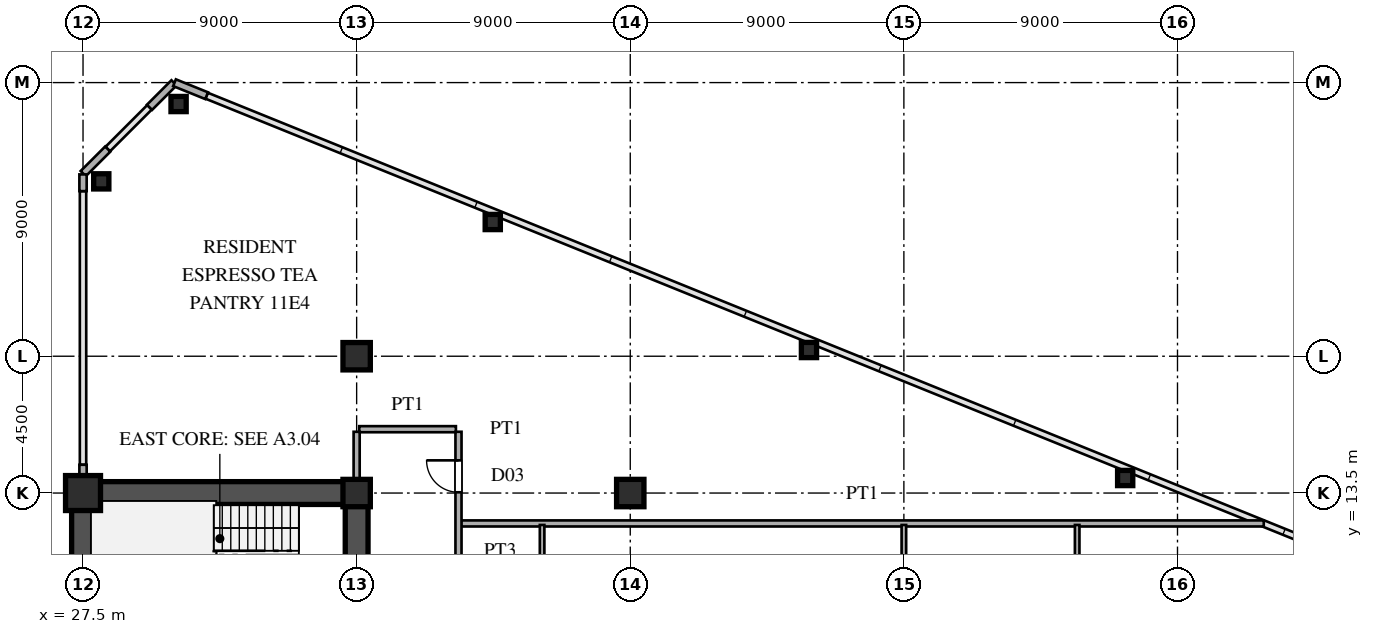
"""IFC4 building model, lengths in metres.
Left out: names, types, materials, properties, quantities, classifications, styles, units other than length and angle.
Written with IfcOpenShell. Run it as: python <this file> out.ifc"""

import sys

from ifc_helpers import new_model, si_unit, direction, frame, frame_2d, origin, origin_2d, place, context, subcontext, project, spatial, rectangle, hollow_rectangle, i_section, extrude, source, transform, mapped, element, fill, save


model = new_model("IFC4")
c1 = context("Model", 3, precision=1e-05, world=origin(), true_north=direction((0.0, 1.0)))
c2 = subcontext(c1, "Body", "Model", "MODEL_VIEW")
j1 = project(units=[si_unit("LENGTHUNIT", "METRE"), si_unit("PLANEANGLEUNIT", "RADIAN")], contexts=[c1])
p1 = place(None, origin())
s1 = spatial("IfcSite", under=j1, at=p1, CompositionType="ELEMENT")
p2 = place(p1, origin())
s2 = spatial("IfcBuilding", under=s1, at=p2, CompositionType="ELEMENT")
p3 = place(p2, frame((0.0, 0.0, 44.1)))
s3 = spatial("IfcBuildingStorey", under=s2, at=p3, CompositionType="ELEMENT", Elevation=44.1)
m1 = source(origin(), c2, "Body", "SweptSolid", [
    extrude(hollow_rectangle(XDim=1.15, YDim=1.15, WallThickness=0.048, at=origin_2d()), origin(), (0.0, 0.0, 1.0), 3.6),
])
p4 = place(p3, frame((27.5, 13.5, 0.0), z_axis=(0.0, 0.0, 1.0), x_axis=(1.0, 0.0, 0.0)))
e1 = element("IfcColumn", 1, at=p4, inside=s3, PredefinedType="COLUMN", context=c2, shape_type="MappedRepresentation", body=[
    mapped(m1, transform((0.0, 0.0, 0.0), scale=1.0)),
])
m2 = source(origin(), c2, "Body", "SweptSolid", [
    extrude(i_section(OverallWidth=0.9, OverallDepth=0.9, WebThickness=0.036, FlangeThickness=0.055, at=origin_2d()), origin(), (0.0, 0.0, 1.0), 3.6),
])
for number, where, z_axis, x_axis in (
    (2, (36.5, 13.5, 0.0), (0.0, 0.0, 1.0), (1.0, 0.0, 0.0)),
    (3, (36.5, 18.0, 0.0), (0.0, 0.0, 1.0), (1.0, 0.0, 0.0)),
    (4, (45.5, 13.5, 0.0), (0.0, 0.0, 1.0), (1.0, 0.0, 0.0)),
):
    element("IfcColumn", number, at=place(p3, frame(where, z_axis=z_axis, x_axis=x_axis)), inside=s3, PredefinedType="COLUMN", context=c2, shape_type="MappedRepresentation", body=[
        mapped(m2, transform((0.0, 0.0, 0.0), scale=1.0)),
    ])
m3 = source(origin(), c2, "Body", "SweptSolid", [
    extrude(hollow_rectangle(XDim=0.5, YDim=0.5, WallThickness=0.02, at=origin_2d()), origin(), (0.0, 0.0, 1.0), 3.6),
])
for number, where, z_axis, x_axis in (
    (5, (30.643, 26.295, 0.0), (0.0, 0.0, 1.0), (1.0, 0.0, 0.0)),
    (6, (28.1, 23.751, 0.0), (0.0, 0.0, 1.0), (1.0, 0.0, 0.0)),
    (7, (40.977, 22.414, 0.0), (0.0, 0.0, 1.0), (1.0, 0.0, 0.0)),
    (8, (51.378, 18.204, 0.0), (0.0, 0.0, 1.0), (1.0, 0.0, 0.0)),
    (9, (61.779, 13.994, 0.0), (0.0, 0.0, 1.0), (1.0, 0.0, 0.0)),
):
    element("IfcColumn", number, at=place(p3, frame(where, z_axis=z_axis, x_axis=x_axis)), inside=s3, PredefinedType="COLUMN", context=c2, shape_type="MappedRepresentation", body=[
        mapped(m3, transform((0.0, 0.0, 0.0), scale=1.0)),
    ])
p5 = place(p3, frame((31.566, 26.569, 0.0), z_axis=(0.0, 0.0, 1.0), x_axis=(-0.927007103665, 0.375043770452, 0.0)))
e10 = element("IfcWall", 10, at=p5, inside=s3, PredefinedType="SOLIDWALL", context=c2, shape_type="SweptSolid", body=[
    extrude(rectangle(XDim=1.14, YDim=0.24, at=frame_2d((0.57, 0.0))), origin(), (0.0, 0.0, 1.0), 3.38),
])
for number, where, z_axis, x_axis in (
    (11, (30.493, 26.993, 0.0), (0.0, 0.0, 1.0), (-0.707, -0.707, 0.0)),
    (12, (28.313, 24.813, 0.0), (0.0, 0.0, 1.0), (-0.707, -0.707, 0.0)),
):
    element("IfcWall", number, at=place(p3, frame(where, z_axis=z_axis, x_axis=x_axis)), inside=s3, PredefinedType="SOLIDWALL", context=c2, shape_type="SweptSolid", body=[
        extrude(rectangle(XDim=1.14, YDim=0.24, at=frame_2d((0.57, 0.0))), origin(), (0.0, 0.0, 1.0), 3.38),
    ])
p6 = place(p3, frame((27.5, 13.88, 0.0), z_axis=(0.0, 0.0, 1.0), x_axis=(0.0, 1.0, 0.0)))
e13 = element("IfcWall", 13, at=p6, inside=s3, PredefinedType="SOLIDWALL", context=c2, shape_type="SweptSolid", body=[
    extrude(rectangle(XDim=0.55, YDim=0.24, at=frame_2d((0.275, 0.0))), origin(), (0.0, 0.0, 1.0), 2.88),
])
p7 = place(p3, frame((27.5, 23.43, 0.0), z_axis=(0.0, 0.0, 1.0), x_axis=(0.0, 1.0, 0.0)))
e14 = element("IfcWall", 14, at=p7, inside=s3, PredefinedType="SOLIDWALL", context=c2, shape_type="SweptSolid", body=[
    extrude(rectangle(XDim=0.55, YDim=0.24, at=frame_2d((0.275, 0.0))), origin(), (0.0, 0.0, 1.0), 3.38),
])
p8 = place(p3, frame((27.5, 1.3, 0.0), z_axis=(0.0, 0.0, 1.0), x_axis=(0.0, 1.0, 0.0)))
e15 = element("IfcWall", 15, at=p8, inside=s3, PredefinedType="SHEAR", context=c2, shape_type="SweptSolid", body=[
    extrude(rectangle(XDim=12.2, YDim=0.75, at=frame_2d((6.1, 0.0))), origin(), (0.0, 0.0, 1.0), 3.38),
])
p9 = place(p3, frame((27.5, 13.5, 0.0), z_axis=(0.0, 0.0, 1.0), x_axis=(1.0, 0.0, 0.0)))
e16 = element("IfcWall", 16, at=p9, inside=s3, PredefinedType="SHEAR", context=c2, shape_type="SweptSolid", body=[
    extrude(rectangle(XDim=9.0, YDim=0.75, at=frame_2d((4.5, 0.0))), origin(), (0.0, 0.0, 1.0), 3.38),
])
p10 = place(p3, frame((36.5, 8.2, 0.0), z_axis=(0.0, 0.0, 1.0), x_axis=(0.0, 1.0, 0.0)))
e17 = element("IfcWall", 17, at=p10, inside=s3, PredefinedType="SHEAR", context=c2, shape_type="SweptSolid", body=[
    extrude(rectangle(XDim=5.45, YDim=0.75, at=frame_2d((2.725, 0.0))), origin(), (0.0, 0.0, 1.0), 3.38),
])
p11 = place(p10, frame((0.245, 0.0, 0.0)))
e18 = element("IfcOpeningElement", 18, at=p11, cuts=e17, PredefinedType="OPENING", context=c2, shape_type="SweptSolid", body=[
    extrude(rectangle(XDim=0.95, YDim=2.15, at=frame_2d((0.475, 1.075))), frame((0.0, 0.385, 0.0), z_axis=(0.0, -1.0, 0.0), x_axis=(1.0, 0.0, 0.0)), (0.0, 0.0, 1.0), 0.77),
])
p12 = place(p3, frame((39.93, 12.5, 0.0), z_axis=(0.0, 0.0, 1.0), x_axis=(1.0, 0.0, 0.0)))
e19 = element("IfcWall", 19, at=p12, inside=s3, PredefinedType="PARTITIONING", context=c2, shape_type="SweptSolid", body=[
    extrude(rectangle(XDim=26.407, YDim=0.2, at=frame_2d((13.204, 0.0))), origin(), (0.0, 0.0, 1.0), 3.38),
])
p13 = place(p3, frame((36.585, 15.6, 0.0), z_axis=(0.0, 0.0, 1.0), x_axis=(1.0, 0.0, 0.0)))
e20 = element("IfcWall", 20, at=p13, inside=s3, PredefinedType="PARTITIONING", context=c2, shape_type="SweptSolid", body=[
    extrude(rectangle(XDim=3.18, YDim=0.2, at=frame_2d((1.59, 0.0))), origin(), (0.0, 0.0, 1.0), 3.38),
])
p14 = place(p3, frame((36.5, 13.88, 0.0), z_axis=(0.0, 0.0, 1.0), x_axis=(0.0, 1.0, 0.0)))
e21 = element("IfcWall", 21, at=p14, inside=s3, PredefinedType="PARTITIONING", context=c2, shape_type="SweptSolid", body=[
    extrude(rectangle(XDim=1.635, YDim=0.2, at=frame_2d((0.817, 0.0))), origin(), (0.0, 0.0, 1.0), 2.68),
])
p15 = place(p3, frame((39.85, -15.515, 0.0), z_axis=(0.0, 0.0, 1.0), x_axis=(0.0, 1.0, 0.0)))
e22 = element("IfcWall", 22, at=p15, inside=s3, PredefinedType="PARTITIONING", context=c2, shape_type="SweptSolid", body=[
    extrude(rectangle(XDim=31.03, YDim=0.2, at=frame_2d((15.515, 0.0))), origin(), (0.0, 0.0, 1.0), 3.38),
])
p16 = place(p15, frame((0.94, 0.0, 0.0)))
e23 = element("IfcOpeningElement", 23, at=p16, cuts=e22, PredefinedType="OPENING", context=c2, shape_type="SweptSolid", body=[
    extrude(rectangle(XDim=1.05, YDim=2.25, at=frame_2d((0.525, 1.125))), frame((0.0, 0.11, 0.0), z_axis=(0.0, -1.0, 0.0), x_axis=(1.0, 0.0, 0.0)), (0.0, 0.0, 1.0), 0.22),
])
p17 = place(p15, frame((9.28, 0.0, 0.0)))
e24 = element("IfcOpeningElement", 24, at=p17, cuts=e22, PredefinedType="OPENING", context=c2, shape_type="SweptSolid", body=[
    extrude(rectangle(XDim=1.05, YDim=2.25, at=frame_2d((0.525, 1.125))), frame((0.0, 0.11, 0.0), z_axis=(0.0, -1.0, 0.0), x_axis=(1.0, 0.0, 0.0)), (0.0, 0.0, 1.0), 0.22),
])
p18 = place(p15, frame((21.825, 0.0, 0.0)))
e25 = element("IfcOpeningElement", 25, at=p18, cuts=e22, PredefinedType="OPENING", context=c2, shape_type="SweptSolid", body=[
    extrude(rectangle(XDim=1.05, YDim=2.25, at=frame_2d((0.525, 1.125))), frame((0.0, 0.11, 0.0), z_axis=(0.0, -1.0, 0.0), x_axis=(1.0, 0.0, 0.0)), (0.0, 0.0, 1.0), 0.22),
])
p19 = place(p15, frame((29.04, 0.0, 0.0)))
e26 = element("IfcOpeningElement", 26, at=p19, cuts=e22, PredefinedType="OPENING", context=c2, shape_type="SweptSolid", body=[
    extrude(rectangle(XDim=1.05, YDim=2.25, at=frame_2d((0.525, 1.125))), frame((0.0, 0.11, 0.0), z_axis=(0.0, -1.0, 0.0), x_axis=(1.0, 0.0, 0.0)), (0.0, 0.0, 1.0), 0.22),
])
p20 = place(p3, frame((42.6, 9.252, 0.0), z_axis=(0.0, 0.0, 1.0), x_axis=(0.0, 1.0, 0.0)))
e27 = element("IfcWall", 27, at=p20, inside=s3, PredefinedType="PARTITIONING", context=c2, shape_type="SweptSolid", body=[
    extrude(rectangle(XDim=3.198, YDim=0.15, at=frame_2d((1.599, 0.0))), origin(), (0.0, 0.0, 1.0), 3.38),
])
p21 = place(p3, frame((54.5, -12.45, 0.0), z_axis=(0.0, 0.0, 1.0), x_axis=(0.0, 1.0, 0.0)))
e28 = element("IfcWall", 28, at=p21, inside=s3, PredefinedType="PARTITIONING", context=c2, shape_type="SweptSolid", body=[
    extrude(rectangle(XDim=24.9, YDim=0.15, at=frame_2d((12.45, 0.0))), origin(), (0.0, 0.0, 1.0), 2.68),
])
p22 = place(p21, frame((6.475, 0.0, 0.0)))
e29 = element("IfcOpeningElement", 29, at=p22, cuts=e28, PredefinedType="OPENING", context=c2, shape_type="SweptSolid", body=[
    extrude(rectangle(XDim=0.95, YDim=2.15, at=frame_2d((0.475, 1.075))), frame((0.0, 0.085, 0.0), z_axis=(0.0, -1.0, 0.0), x_axis=(1.0, 0.0, 0.0)), (0.0, 0.0, 1.0), 0.17),
])
p23 = place(p21, frame((18.975, 0.0, 0.0)))
e30 = element("IfcOpeningElement", 30, at=p23, cuts=e28, PredefinedType="OPENING", context=c2, shape_type="SweptSolid", body=[
    extrude(rectangle(XDim=0.95, YDim=2.15, at=frame_2d((0.475, 1.075))), frame((0.0, 0.085, 0.0), z_axis=(0.0, -1.0, 0.0), x_axis=(1.0, 0.0, 0.0)), (0.0, 0.0, 1.0), 0.17),
])
p24 = place(p3, frame((60.2, -12.45, 0.0), z_axis=(0.0, 0.0, 1.0), x_axis=(0.0, 1.0, 0.0)))
e31 = element("IfcWall", 31, at=p24, inside=s3, PredefinedType="PARTITIONING", context=c2, shape_type="SweptSolid", body=[
    extrude(rectangle(XDim=24.9, YDim=0.15, at=frame_2d((12.45, 0.0))), origin(), (0.0, 0.0, 1.0), 3.38),
])
p25 = place(p24, frame((1.808, 0.0, 0.0)))
e32 = element("IfcOpeningElement", 32, at=p25, cuts=e31, PredefinedType="OPENING", context=c2, shape_type="SweptSolid", body=[
    extrude(rectangle(XDim=0.95, YDim=2.15, at=frame_2d((0.475, 1.075))), frame((0.0, 0.085, 0.0), z_axis=(0.0, -1.0, 0.0), x_axis=(1.0, 0.0, 0.0)), (0.0, 0.0, 1.0), 0.17),
])
p26 = place(p24, frame((6.475, 0.0, 0.0)))
e33 = element("IfcOpeningElement", 33, at=p26, cuts=e31, PredefinedType="OPENING", context=c2, shape_type="SweptSolid", body=[
    extrude(rectangle(XDim=0.95, YDim=2.15, at=frame_2d((0.475, 1.075))), frame((0.0, 0.085, 0.0), z_axis=(0.0, -1.0, 0.0), x_axis=(1.0, 0.0, 0.0)), (0.0, 0.0, 1.0), 0.17),
])
p27 = place(p24, frame((11.142, 0.0, 0.0)))
e34 = element("IfcOpeningElement", 34, at=p27, cuts=e31, PredefinedType="OPENING", context=c2, shape_type="SweptSolid", body=[
    extrude(rectangle(XDim=0.95, YDim=2.15, at=frame_2d((0.475, 1.075))), frame((0.0, 0.085, 0.0), z_axis=(0.0, -1.0, 0.0), x_axis=(1.0, 0.0, 0.0)), (0.0, 0.0, 1.0), 0.17),
])
p28 = place(p24, frame((15.308, 0.0, 0.0)))
e35 = element("IfcOpeningElement", 35, at=p28, cuts=e31, PredefinedType="OPENING", context=c2, shape_type="SweptSolid", body=[
    extrude(rectangle(XDim=0.95, YDim=2.15, at=frame_2d((0.475, 1.075))), frame((0.0, 0.085, 0.0), z_axis=(0.0, -1.0, 0.0), x_axis=(1.0, 0.0, 0.0)), (0.0, 0.0, 1.0), 0.17),
])
p29 = place(p24, frame((18.975, 0.0, 0.0)))
e36 = element("IfcOpeningElement", 36, at=p29, cuts=e31, PredefinedType="OPENING", context=c2, shape_type="SweptSolid", body=[
    extrude(rectangle(XDim=0.95, YDim=2.15, at=frame_2d((0.475, 1.075))), frame((0.0, 0.085, 0.0), z_axis=(0.0, -1.0, 0.0), x_axis=(1.0, 0.0, 0.0)), (0.0, 0.0, 1.0), 0.17),
])
m4 = source(origin(), c2, "Body", "SweptSolid", [
    extrude(rectangle(XDim=1.05, YDim=2.25, at=frame_2d((0.525, 1.125))), frame((0.0, 0.025, 0.0), z_axis=(0.0, -1.0, 0.0), x_axis=(1.0, 0.0, 0.0)), (0.0, 0.0, 1.0), 0.05),
])
p30 = place(p19, origin())
e37 = element("IfcDoor", 37, at=p30, inside=s3, OperationType="SINGLE_SWING_RIGHT", PredefinedType="DOOR", context=c2, shape_type="MappedRepresentation", body=[
    mapped(m4, transform((0.0, 0.0, 0.0), scale=1.0)),
])
fill(e26, e37)
save(model, sys.argv[1])
